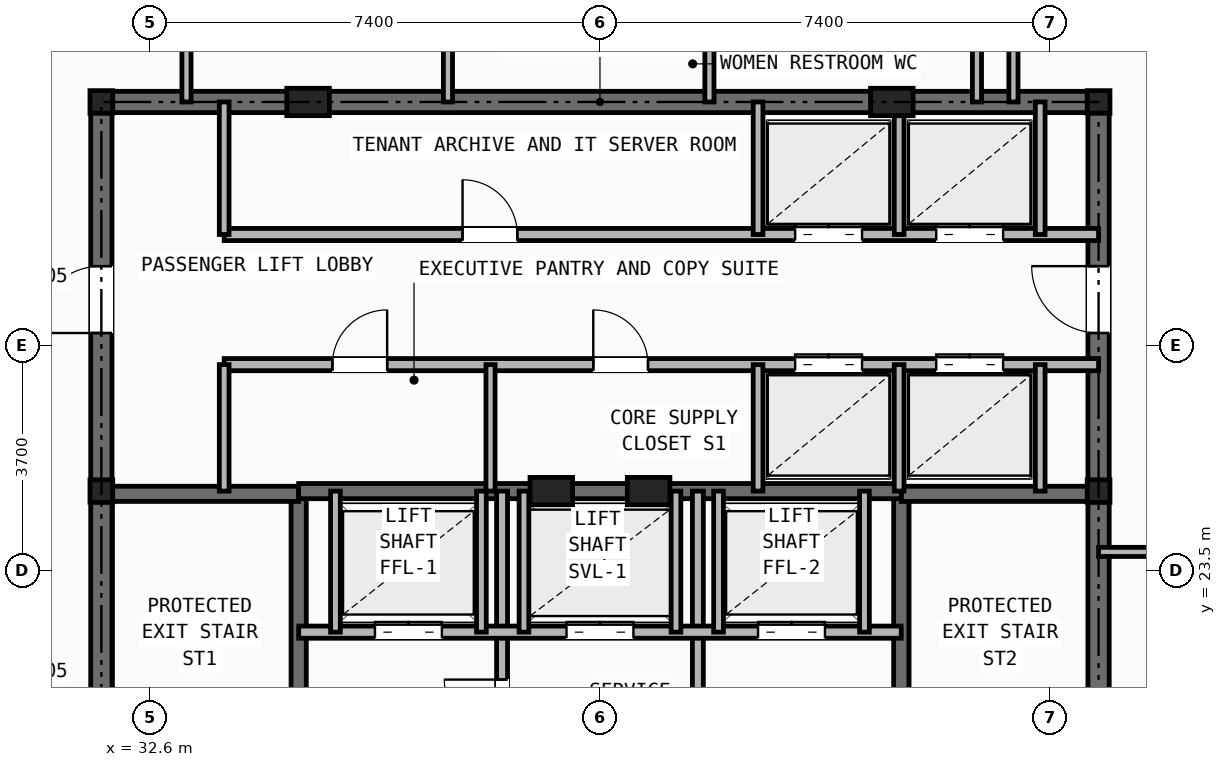
"""IFC4 building model, lengths in metres.
Left out: names, types, materials, properties, quantities, classifications, styles, units other than length and angle.
Written with IfcOpenShell. Run it as: python <this file> out.ifc"""

import sys

from ifc_helpers import new_model, si_unit, direction, frame, frame_2d, origin, origin_2d, place, context, subcontext, project, spatial, rectangle, i_section, extrude, element, fill, save


model = new_model("IFC4")
c1 = context("Model", 3, precision=1e-05, world=origin(), true_north=direction((0.0, 1.0)))
c2 = subcontext(c1, "Body", "Model", "MODEL_VIEW")
j1 = project(units=[si_unit("LENGTHUNIT", "METRE"), si_unit("PLANEANGLEUNIT", "RADIAN")], contexts=[c1])
p1 = place(None, origin())
s1 = spatial("IfcSite", under=j1, at=p1, CompositionType="ELEMENT")
p2 = place(p1, origin())
s2 = spatial("IfcBuilding", under=s1, at=p2, CompositionType="ELEMENT")
p3 = place(p2, frame((0.0, 0.0, 232.9)))
s3 = spatial("IfcBuildingStorey", under=s2, at=p3, CompositionType="ELEMENT", Elevation=232.9)
for number, where, z_axis, x_axis in (
    (1, (31.8, 24.8, 0.0), (0.0, 0.0, 1.0), (1.0, 0.0, 0.0)),
    (2, (48.2, 24.8, 0.0), (0.0, 0.0, 1.0), (1.0, 0.0, 0.0)),
    (3, (31.8, 31.2, 0.0), (0.0, 0.0, 1.0), (1.0, 0.0, 0.0)),
    (4, (48.2, 31.2, 0.0), (0.0, 0.0, 1.0), (1.0, 0.0, 0.0)),
):
    element("IfcColumn", number, at=place(p3, frame(where, z_axis=z_axis, x_axis=x_axis)), inside=s3, PredefinedType="COLUMN", context=c2, shape_type="SweptSolid", body=[
        extrude(i_section(OverallWidth=0.374, OverallDepth=0.372, WebThickness=0.016, FlangeThickness=0.026, at=origin_2d()), origin(), (0.0, 0.0, 1.0), 3.5),
    ])
for number, where, z_axis, x_axis in (
    (5, (35.2, 31.2, 0.0), (0.0, 0.0, 1.0), (1.0, 0.0, 0.0)),
    (6, (44.8, 31.2, 0.0), (0.0, 0.0, 1.0), (1.0, 0.0, 0.0)),
    (7, (39.2, 24.8, 0.0), (0.0, 0.0, 1.0), (1.0, 0.0, 0.0)),
    (8, (40.8, 24.8, 0.0), (0.0, 0.0, 1.0), (1.0, 0.0, 0.0)),
):
    element("IfcColumn", number, at=place(p3, frame(where, z_axis=z_axis, x_axis=x_axis)), inside=s3, PredefinedType="PILASTER", context=c2, shape_type="SweptSolid", body=[
        extrude(rectangle(XDim=0.7, YDim=0.45, at=origin_2d()), origin(), (0.0, 0.0, 1.0), 3.5),
    ])
p4 = place(p3, frame((31.8, 31.2, 0.0), z_axis=(0.0, 0.0, 1.0), x_axis=(1.0, 0.0, 0.0)))
e9 = element("IfcWall", 9, at=p4, inside=s3, PredefinedType="SHEAR", context=c2, shape_type="SweptSolid", body=[
    extrude(rectangle(XDim=16.4, YDim=0.35, at=frame_2d((8.2, 0.0))), origin(), (0.0, 0.0, 1.0), 3.25),
])
p5 = place(p3, frame((31.8, 16.4, 0.0), z_axis=(0.0, 0.0, 1.0), x_axis=(0.0, 1.0, 0.0)))
e10 = element("IfcWall", 10, at=p5, inside=s3, PredefinedType="SHEAR", context=c2, shape_type="SweptSolid", body=[
    extrude(rectangle(XDim=14.8, YDim=0.35, at=frame_2d((7.4, 0.0))), origin(), (0.0, 0.0, 1.0), 3.25),
])
p6 = place(p5, frame((11.0, 0.0, 0.0)))
e11 = element("IfcOpeningElement", 11, at=p6, cuts=e10, PredefinedType="OPENING", context=c2, shape_type="SweptSolid", body=[
    extrude(rectangle(XDim=1.1, YDim=2.15, at=frame_2d((0.55, 1.075))), frame((0.0, 0.185, 0.0), z_axis=(0.0, -1.0, 0.0), x_axis=(1.0, 0.0, 0.0)), (0.0, 0.0, 1.0), 0.37),
])
p7 = place(p3, frame((48.2, 16.4, 0.0), z_axis=(0.0, 0.0, 1.0), x_axis=(0.0, 1.0, 0.0)))
e12 = element("IfcWall", 12, at=p7, inside=s3, PredefinedType="SHEAR", context=c2, shape_type="SweptSolid", body=[
    extrude(rectangle(XDim=14.8, YDim=0.35, at=frame_2d((7.4, 0.0))), origin(), (0.0, 0.0, 1.0), 3.25),
])
p8 = place(p7, frame((11.0, 0.0, 0.0)))
e13 = element("IfcOpeningElement", 13, at=p8, cuts=e12, PredefinedType="OPENING", context=c2, shape_type="SweptSolid", body=[
    extrude(rectangle(XDim=1.1, YDim=2.15, at=frame_2d((0.55, 1.075))), frame((0.0, 0.185, 0.0), z_axis=(0.0, -1.0, 0.0), x_axis=(1.0, 0.0, 0.0)), (0.0, 0.0, 1.0), 0.37),
])
p9 = place(p3, frame((35.045, 16.4, 0.0), z_axis=(0.0, 0.0, 1.0), x_axis=(0.0, 1.0, 0.0)))
e14 = element("IfcWall", 14, at=p9, inside=s3, PredefinedType="SHEAR", context=c2, shape_type="SweptSolid", body=[
    extrude(rectangle(XDim=8.4, YDim=0.25, at=frame_2d((4.2, 0.0))), origin(), (0.0, 0.0, 1.0), 3.25),
])
p10 = place(p9, frame((0.45, 0.0, 0.0)))
e15 = element("IfcOpeningElement", 15, at=p10, cuts=e14, PredefinedType="OPENING", context=c2, shape_type="SweptSolid", body=[
    extrude(rectangle(XDim=0.95, YDim=2.1, at=frame_2d((0.475, 1.05))), frame((0.0, 0.135, 0.0), z_axis=(0.0, -1.0, 0.0), x_axis=(1.0, 0.0, 0.0)), (0.0, 0.0, 1.0), 0.27),
])
p11 = place(p3, frame((31.8, 24.755, 0.0), z_axis=(0.0, 0.0, 1.0), x_axis=(1.0, 0.0, 0.0)))
e16 = element("IfcWall", 16, at=p11, inside=s3, PredefinedType="SHEAR", context=c2, shape_type="SweptSolid", body=[
    extrude(rectangle(XDim=3.245, YDim=0.25, at=frame_2d((1.623, 0.0))), origin(), (0.0, 0.0, 1.0), 3.25),
])
p12 = place(p3, frame((44.955, 16.4, 0.0), z_axis=(0.0, 0.0, 1.0), x_axis=(0.0, 1.0, 0.0)))
e17 = element("IfcWall", 17, at=p12, inside=s3, PredefinedType="SHEAR", context=c2, shape_type="SweptSolid", body=[
    extrude(rectangle(XDim=8.4, YDim=0.25, at=frame_2d((4.2, 0.0))), origin(), (0.0, 0.0, 1.0), 3.25),
])
p13 = place(p12, frame((0.45, 0.0, 0.0)))
e18 = element("IfcOpeningElement", 18, at=p13, cuts=e17, PredefinedType="OPENING", context=c2, shape_type="SweptSolid", body=[
    extrude(rectangle(XDim=0.95, YDim=2.1, at=frame_2d((0.475, 1.05))), frame((0.0, 0.135, 0.0), z_axis=(0.0, -1.0, 0.0), x_axis=(1.0, 0.0, 0.0)), (0.0, 0.0, 1.0), 0.27),
])
p14 = place(p3, frame((44.955, 24.755, 0.0), z_axis=(0.0, 0.0, 1.0), x_axis=(1.0, 0.0, 0.0)))
e19 = element("IfcWall", 19, at=p14, inside=s3, PredefinedType="SHEAR", context=c2, shape_type="SweptSolid", body=[
    extrude(rectangle(XDim=3.245, YDim=0.25, at=frame_2d((1.623, 0.0))), origin(), (0.0, 0.0, 1.0), 3.25),
])
p15 = place(p3, frame((35.045, 24.8, 0.0), z_axis=(0.0, 0.0, 1.0), x_axis=(1.0, 0.0, 0.0)))
e20 = element("IfcWall", 20, at=p15, inside=s3, PredefinedType="SHEAR", context=c2, shape_type="SweptSolid", body=[
    extrude(rectangle(XDim=9.91, YDim=0.25, at=frame_2d((4.955, 0.0))), origin(), (0.0, 0.0, 1.0), 3.25),
])
p16 = place(p3, frame((38.39, 16.4, 0.0), z_axis=(0.0, 0.0, 1.0), x_axis=(0.0, 1.0, 0.0)))
e21 = element("IfcWall", 21, at=p16, inside=s3, PredefinedType="PARTITIONING", context=c2, shape_type="SweptSolid", body=[
    extrude(rectangle(XDim=8.4, YDim=0.18, at=frame_2d((4.2, 0.0))), origin(), (0.0, 0.0, 1.0), 2.705),
])
p17 = place(p16, frame((1.8, 0.0, 0.0)))
e22 = element("IfcOpeningElement", 22, at=p17, cuts=e21, PredefinedType="OPENING", context=c2, shape_type="SweptSolid", body=[
    extrude(rectangle(XDim=0.85, YDim=2.05, at=frame_2d((0.425, 1.025))), frame((0.0, 0.1, 0.0), z_axis=(0.0, -1.0, 0.0), x_axis=(1.0, 0.0, 0.0)), (0.0, 0.0, 1.0), 0.2),
])
p18 = place(p16, frame((4.35, 0.0, 0.0)))
e23 = element("IfcOpeningElement", 23, at=p18, cuts=e21, PredefinedType="OPENING", context=c2, shape_type="SweptSolid", body=[
    extrude(rectangle(XDim=0.95, YDim=2.1, at=frame_2d((0.475, 1.05))), frame((0.0, 0.1, 0.0), z_axis=(0.0, -1.0, 0.0), x_axis=(1.0, 0.0, 0.0)), (0.0, 0.0, 1.0), 0.2),
])
p19 = place(p3, frame((41.61, 16.4, 0.0), z_axis=(0.0, 0.0, 1.0), x_axis=(0.0, 1.0, 0.0)))
e24 = element("IfcWall", 24, at=p19, inside=s3, PredefinedType="PARTITIONING", context=c2, shape_type="SweptSolid", body=[
    extrude(rectangle(XDim=8.4, YDim=0.18, at=frame_2d((4.2, 0.0))), origin(), (0.0, 0.0, 1.0), 2.705),
])
p20 = place(p19, frame((1.8, 0.0, 0.0)))
e25 = element("IfcOpeningElement", 25, at=p20, cuts=e24, PredefinedType="OPENING", context=c2, shape_type="SweptSolid", body=[
    extrude(rectangle(XDim=0.85, YDim=2.05, at=frame_2d((0.425, 1.025))), frame((0.0, 0.1, 0.0), z_axis=(0.0, -1.0, 0.0), x_axis=(1.0, 0.0, 0.0)), (0.0, 0.0, 1.0), 0.2),
])
p21 = place(p3, frame((35.045, 22.48, 0.0), z_axis=(0.0, 0.0, 1.0), x_axis=(1.0, 0.0, 0.0)))
e26 = element("IfcWall", 26, at=p21, inside=s3, PredefinedType="SOLIDWALL", context=c2, shape_type="SweptSolid", body=[
    extrude(rectangle(XDim=9.91, YDim=0.2, at=frame_2d((4.955, 0.0))), origin(), (0.0, 0.0, 1.0), 3.25),
])
p22 = place(p21, frame((1.255, 0.0, 0.0)))
e27 = element("IfcOpeningElement", 27, at=p22, cuts=e26, PredefinedType="OPENING", context=c2, shape_type="SweptSolid", body=[
    extrude(rectangle(XDim=1.1, YDim=2.15, at=frame_2d((0.55, 1.075))), frame((0.0, 0.11, 0.0), z_axis=(0.0, -1.0, 0.0), x_axis=(1.0, 0.0, 0.0)), (0.0, 0.0, 1.0), 0.22),
])
p23 = place(p21, frame((7.555, 0.0, 0.0)))
e28 = element("IfcOpeningElement", 28, at=p23, cuts=e26, PredefinedType="OPENING", context=c2, shape_type="SweptSolid", body=[
    extrude(rectangle(XDim=1.1, YDim=2.15, at=frame_2d((0.55, 1.075))), frame((0.0, 0.11, 0.0), z_axis=(0.0, -1.0, 0.0), x_axis=(1.0, 0.0, 0.0)), (0.0, 0.0, 1.0), 0.22),
])
p24 = place(p21, frame((4.405, 0.0, 0.0)))
e29 = element("IfcOpeningElement", 29, at=p24, cuts=e26, PredefinedType="OPENING", context=c2, shape_type="SweptSolid", body=[
    extrude(rectangle(XDim=1.1, YDim=2.15, at=frame_2d((0.55, 1.075))), frame((0.0, 0.11, 0.0), z_axis=(0.0, -1.0, 0.0), x_axis=(1.0, 0.0, 0.0)), (0.0, 0.0, 1.0), 0.22),
])
for number, where, z_axis, x_axis in (
    (30, (35.65, 22.48, 0.0), (0.0, 0.0, 1.0), (0.0, 1.0, 0.0)),
    (31, (38.05, 22.48, 0.0), (0.0, 0.0, 1.0), (0.0, 1.0, 0.0)),
    (32, (41.95, 22.48, 0.0), (0.0, 0.0, 1.0), (0.0, 1.0, 0.0)),
    (33, (44.35, 22.48, 0.0), (0.0, 0.0, 1.0), (0.0, 1.0, 0.0)),
    (34, (38.75, 22.48, 0.0), (0.0, 0.0, 1.0), (0.0, 1.0, 0.0)),
    (35, (41.25, 22.48, 0.0), (0.0, 0.0, 1.0), (0.0, 1.0, 0.0)),
):
    element("IfcWall", number, at=place(p3, frame(where, z_axis=z_axis, x_axis=x_axis)), inside=s3, PredefinedType="SOLIDWALL", context=c2, shape_type="SweptSolid", body=[
        extrude(rectangle(XDim=2.32, YDim=0.16, at=frame_2d((1.16, 0.0))), origin(), (0.0, 0.0, 1.0), 3.25),
    ])
p25 = place(p3, frame((33.82, 29.02, 0.0), z_axis=(0.0, 0.0, 1.0), x_axis=(1.0, 0.0, 0.0)))
e36 = element("IfcWall", 36, at=p25, inside=s3, PredefinedType="SOLIDWALL", context=c2, shape_type="SweptSolid", body=[
    extrude(rectangle(XDim=14.38, YDim=0.2, at=frame_2d((7.19, 0.0))), origin(), (0.0, 0.0, 1.0), 2.705),
])
p26 = place(p25, frame((3.92, 0.0, 0.0)))
e37 = element("IfcOpeningElement", 37, at=p26, cuts=e36, PredefinedType="OPENING", context=c2, shape_type="SweptSolid", body=[
    extrude(rectangle(XDim=0.9, YDim=2.1, at=frame_2d((0.45, 1.05))), frame((0.0, 0.11, 0.0), z_axis=(0.0, -1.0, 0.0), x_axis=(1.0, 0.0, 0.0)), (0.0, 0.0, 1.0), 0.22),
])
p27 = place(p25, frame((9.39, 0.0, 0.0)))
e38 = element("IfcOpeningElement", 38, at=p27, cuts=e36, PredefinedType="OPENING", context=c2, shape_type="SweptSolid", body=[
    extrude(rectangle(XDim=1.1, YDim=2.15, at=frame_2d((0.55, 1.075))), frame((0.0, 0.11, 0.0), z_axis=(0.0, -1.0, 0.0), x_axis=(1.0, 0.0, 0.0)), (0.0, 0.0, 1.0), 0.22),
])
p28 = place(p25, frame((11.71, 0.0, 0.0)))
e39 = element("IfcOpeningElement", 39, at=p28, cuts=e36, PredefinedType="OPENING", context=c2, shape_type="SweptSolid", body=[
    extrude(rectangle(XDim=1.1, YDim=2.15, at=frame_2d((0.55, 1.075))), frame((0.0, 0.11, 0.0), z_axis=(0.0, -1.0, 0.0), x_axis=(1.0, 0.0, 0.0)), (0.0, 0.0, 1.0), 0.22),
])
p29 = place(p3, frame((33.82, 26.88, 0.0), z_axis=(0.0, 0.0, 1.0), x_axis=(1.0, 0.0, 0.0)))
e40 = element("IfcWall", 40, at=p29, inside=s3, PredefinedType="SOLIDWALL", context=c2, shape_type="SweptSolid", body=[
    extrude(rectangle(XDim=14.38, YDim=0.2, at=frame_2d((7.19, 0.0))), origin(), (0.0, 0.0, 1.0), 2.705),
])
p30 = place(p29, frame((1.78, 0.0, 0.0)))
e41 = element("IfcOpeningElement", 41, at=p30, cuts=e40, PredefinedType="OPENING", context=c2, shape_type="SweptSolid", body=[
    extrude(rectangle(XDim=0.9, YDim=2.1, at=frame_2d((0.45, 1.05))), frame((0.0, 0.11, 0.0), z_axis=(0.0, -1.0, 0.0), x_axis=(1.0, 0.0, 0.0)), (0.0, 0.0, 1.0), 0.22),
])
p31 = place(p29, frame((6.07, 0.0, 0.0)))
e42 = element("IfcOpeningElement", 42, at=p31, cuts=e40, PredefinedType="OPENING", context=c2, shape_type="SweptSolid", body=[
    extrude(rectangle(XDim=0.9, YDim=2.1, at=frame_2d((0.45, 1.05))), frame((0.0, 0.11, 0.0), z_axis=(0.0, -1.0, 0.0), x_axis=(1.0, 0.0, 0.0)), (0.0, 0.0, 1.0), 0.22),
])
p32 = place(p29, frame((9.39, 0.0, 0.0)))
e43 = element("IfcOpeningElement", 43, at=p32, cuts=e40, PredefinedType="OPENING", context=c2, shape_type="SweptSolid", body=[
    extrude(rectangle(XDim=1.1, YDim=2.15, at=frame_2d((0.55, 1.075))), frame((0.0, 0.11, 0.0), z_axis=(0.0, -1.0, 0.0), x_axis=(1.0, 0.0, 0.0)), (0.0, 0.0, 1.0), 0.22),
])
p33 = place(p29, frame((11.71, 0.0, 0.0)))
e44 = element("IfcOpeningElement", 44, at=p33, cuts=e40, PredefinedType="OPENING", context=c2, shape_type="SweptSolid", body=[
    extrude(rectangle(XDim=1.1, YDim=2.15, at=frame_2d((0.55, 1.075))), frame((0.0, 0.11, 0.0), z_axis=(0.0, -1.0, 0.0), x_axis=(1.0, 0.0, 0.0)), (0.0, 0.0, 1.0), 0.22),
])
p34 = place(p3, frame((33.82, 29.02, 0.0), z_axis=(0.0, 0.0, 1.0), x_axis=(0.0, 1.0, 0.0)))
e45 = element("IfcWall", 45, at=p34, inside=s3, PredefinedType="SOLIDWALL", context=c2, shape_type="SweptSolid", body=[
    extrude(rectangle(XDim=2.18, YDim=0.16, at=frame_2d((1.09, 0.0))), origin(), (0.0, 0.0, 1.0), 2.705),
])
p35 = place(p3, frame((33.82, 24.8, 0.0), z_axis=(0.0, 0.0, 1.0), x_axis=(0.0, 1.0, 0.0)))
e46 = element("IfcWall", 46, at=p35, inside=s3, PredefinedType="SOLIDWALL", context=c2, shape_type="SweptSolid", body=[
    extrude(rectangle(XDim=2.08, YDim=0.16, at=frame_2d((1.04, 0.0))), origin(), (0.0, 0.0, 1.0), 3.25),
])
p36 = place(p3, frame((38.2, 24.8, 0.0), z_axis=(0.0, 0.0, 1.0), x_axis=(0.0, 1.0, 0.0)))
e47 = element("IfcWall", 47, at=p36, inside=s3, PredefinedType="PARTITIONING", context=c2, shape_type="SweptSolid", body=[
    extrude(rectangle(XDim=2.08, YDim=0.15, at=frame_2d((1.04, 0.0))), origin(), (0.0, 0.0, 1.0), 3.25),
])
for number, where, z_axis, x_axis in (
    (48, (42.6, 29.02, 0.0), (0.0, 0.0, 1.0), (0.0, 1.0, 0.0)),
    (49, (44.92, 29.02, 0.0), (0.0, 0.0, 1.0), (0.0, 1.0, 0.0)),
    (50, (47.24, 29.02, 0.0), (0.0, 0.0, 1.0), (0.0, 1.0, 0.0)),
):
    element("IfcWall", number, at=place(p3, frame(where, z_axis=z_axis, x_axis=x_axis)), inside=s3, PredefinedType="SOLIDWALL", context=c2, shape_type="SweptSolid", body=[
        extrude(rectangle(XDim=2.18, YDim=0.16, at=frame_2d((1.09, 0.0))), origin(), (0.0, 0.0, 1.0), 2.705),
    ])
for number, where, z_axis, x_axis in (
    (51, (42.6, 24.8, 0.0), (0.0, 0.0, 1.0), (0.0, 1.0, 0.0)),
    (52, (44.92, 24.8, 0.0), (0.0, 0.0, 1.0), (0.0, 1.0, 0.0)),
    (53, (47.24, 24.8, 0.0), (0.0, 0.0, 1.0), (0.0, 1.0, 0.0)),
):
    element("IfcWall", number, at=place(p3, frame(where, z_axis=z_axis, x_axis=x_axis)), inside=s3, PredefinedType="SOLIDWALL", context=c2, shape_type="SweptSolid", body=[
        extrude(rectangle(XDim=2.08, YDim=0.16, at=frame_2d((1.04, 0.0))), origin(), (0.0, 0.0, 1.0), 3.25),
    ])
for number, where, z_axis, x_axis in (
    (54, (33.2, 31.2, 0.0), (0.0, 0.0, 1.0), (0.0, 1.0, 0.0)),
    (55, (46.2, 31.2, 0.0), (0.0, 0.0, 1.0), (0.0, 1.0, 0.0)),
    (56, (37.5, 31.2, 0.0), (0.0, 0.0, 1.0), (0.0, 1.0, 0.0)),
    (57, (41.8, 31.2, 0.0), (0.0, 0.0, 1.0), (0.0, 1.0, 0.0)),
):
    element("IfcWall", number, at=place(p3, frame(where, z_axis=z_axis, x_axis=x_axis)), inside=s3, PredefinedType="PARTITIONING", context=c2, shape_type="SweptSolid", body=[
        extrude(rectangle(XDim=2.6, YDim=0.15, at=frame_2d((1.3, 0.0))), origin(), (0.0, 0.0, 1.0), 2.705),
    ])
p37 = place(p3, frame((46.8, 31.2, 0.0), z_axis=(0.0, 0.0, 1.0), x_axis=(0.0, 1.0, 0.0)))
e58 = element("IfcWall", 58, at=p37, inside=s3, PredefinedType="PARTITIONING", context=c2, shape_type="SweptSolid", body=[
    extrude(rectangle(XDim=4.5, YDim=0.15, at=frame_2d((2.25, 0.0))), origin(), (0.0, 0.0, 1.0), 2.705),
])
p38 = place(p3, frame((48.2, 23.8, 0.0), z_axis=(0.0, 0.0, 1.0), x_axis=(1.0, 0.0, 0.0)))
e59 = element("IfcWall", 59, at=p38, inside=s3, PredefinedType="PARTITIONING", context=c2, shape_type="SweptSolid", body=[
    extrude(rectangle(XDim=10.602, YDim=0.15, at=frame_2d((5.301, 0.0))), origin(), (0.0, 0.0, 1.0), 2.628),
])
p39 = place(p38, frame((1.4, 0.0, 0.0)))
e60 = element("IfcOpeningElement", 60, at=p39, cuts=e59, PredefinedType="OPENING", context=c2, shape_type="SweptSolid", body=[
    extrude(rectangle(XDim=0.95, YDim=2.1, at=frame_2d((0.475, 1.05))), frame((0.0, 0.085, 0.0), z_axis=(0.0, -1.0, 0.0), x_axis=(1.0, 0.0, 0.0)), (0.0, 0.0, 1.0), 0.17),
])
p40 = place(p18, origin())
e61 = element("IfcDoor", 61, at=p40, inside=s3, OperationType="SINGLE_SWING_RIGHT", PredefinedType="DOOR", context=c2, shape_type="SweptSolid", body=[
    extrude(rectangle(XDim=0.95, YDim=2.1, at=frame_2d((0.475, 1.05))), frame((0.0, 0.025, 0.0), z_axis=(0.0, -1.0, 0.0), x_axis=(1.0, 0.0, 0.0)), (0.0, 0.0, 1.0), 0.05),
])
fill(e23, e61)
p41 = place(p22, origin())
e62 = element("IfcDoor", 62, at=p41, inside=s3, OperationType="DOUBLE_DOOR_SLIDING", PredefinedType="DOOR", context=c2, shape_type="SweptSolid", body=[
    extrude(rectangle(XDim=1.1, YDim=2.15, at=frame_2d((0.55, 1.075))), frame((0.0, 0.025, 0.0), z_axis=(0.0, -1.0, 0.0), x_axis=(1.0, 0.0, 0.0)), (0.0, 0.0, 1.0), 0.05),
])
fill(e27, e62)
p42 = place(p23, origin())
e63 = element("IfcDoor", 63, at=p42, inside=s3, OperationType="DOUBLE_DOOR_SLIDING", PredefinedType="DOOR", context=c2, shape_type="SweptSolid", body=[
    extrude(rectangle(XDim=1.1, YDim=2.15, at=frame_2d((0.55, 1.075))), frame((0.0, 0.025, 0.0), z_axis=(0.0, -1.0, 0.0), x_axis=(1.0, 0.0, 0.0)), (0.0, 0.0, 1.0), 0.05),
])
fill(e28, e63)
p43 = place(p24, origin())
e64 = element("IfcDoor", 64, at=p43, inside=s3, OperationType="DOUBLE_DOOR_SLIDING", PredefinedType="DOOR", context=c2, shape_type="SweptSolid", body=[
    extrude(rectangle(XDim=1.1, YDim=2.15, at=frame_2d((0.55, 1.075))), frame((0.0, 0.025, 0.0), z_axis=(0.0, -1.0, 0.0), x_axis=(1.0, 0.0, 0.0)), (0.0, 0.0, 1.0), 0.05),
])
fill(e29, e64)
p44 = place(p6, origin())
e65 = element("IfcDoor", 65, at=p44, inside=s3, OperationType="SINGLE_SWING_LEFT", PredefinedType="DOOR", context=c2, shape_type="SweptSolid", body=[
    extrude(rectangle(XDim=1.1, YDim=2.15, at=frame_2d((0.55, 1.075))), frame((0.0, 0.025, 0.0), z_axis=(0.0, -1.0, 0.0), x_axis=(1.0, 0.0, 0.0)), (0.0, 0.0, 1.0), 0.05),
])
fill(e11, e65)
p45 = place(p8, origin())
e66 = element("IfcDoor", 66, at=p45, inside=s3, OperationType="SINGLE_SWING_RIGHT", PredefinedType="DOOR", context=c2, shape_type="SweptSolid", body=[
    extrude(rectangle(XDim=1.1, YDim=2.15, at=frame_2d((0.55, 1.075))), frame((0.0, 0.025, 0.0), z_axis=(0.0, -1.0, 0.0), x_axis=(1.0, 0.0, 0.0)), (0.0, 0.0, 1.0), 0.05),
])
fill(e13, e66)
p46 = place(p26, origin())
e67 = element("IfcDoor", 67, at=p46, inside=s3, OperationType="SINGLE_SWING_LEFT", PredefinedType="DOOR", context=c2, shape_type="SweptSolid", body=[
    extrude(rectangle(XDim=0.9, YDim=2.1, at=frame_2d((0.45, 1.05))), frame((0.0, 0.025, 0.0), z_axis=(0.0, -1.0, 0.0), x_axis=(1.0, 0.0, 0.0)), (0.0, 0.0, 1.0), 0.05),
])
fill(e37, e67)
p47 = place(p30, origin())
e68 = element("IfcDoor", 68, at=p47, inside=s3, OperationType="SINGLE_SWING_RIGHT", PredefinedType="DOOR", context=c2, shape_type="SweptSolid", body=[
    extrude(rectangle(XDim=0.9, YDim=2.1, at=frame_2d((0.45, 1.05))), frame((0.0, 0.025, 0.0), z_axis=(0.0, -1.0, 0.0), x_axis=(1.0, 0.0, 0.0)), (0.0, 0.0, 1.0), 0.05),
])
fill(e41, e68)
p48 = place(p31, origin())
e69 = element("IfcDoor", 69, at=p48, inside=s3, OperationType="SINGLE_SWING_LEFT", PredefinedType="DOOR", context=c2, shape_type="SweptSolid", body=[
    extrude(rectangle(XDim=0.9, YDim=2.1, at=frame_2d((0.45, 1.05))), frame((0.0, 0.025, 0.0), z_axis=(0.0, -1.0, 0.0), x_axis=(1.0, 0.0, 0.0)), (0.0, 0.0, 1.0), 0.05),
])
fill(e42, e69)
p49 = place(p27, origin())
e70 = element("IfcDoor", 70, at=p49, inside=s3, OperationType="DOUBLE_DOOR_SLIDING", PredefinedType="DOOR", context=c2, shape_type="SweptSolid", body=[
    extrude(rectangle(XDim=1.1, YDim=2.15, at=frame_2d((0.55, 1.075))), frame((0.0, 0.025, 0.0), z_axis=(0.0, -1.0, 0.0), x_axis=(1.0, 0.0, 0.0)), (0.0, 0.0, 1.0), 0.05),
])
fill(e38, e70)
p50 = place(p28, origin())
e71 = element("IfcDoor", 71, at=p50, inside=s3, OperationType="DOUBLE_DOOR_SLIDING", PredefinedType="DOOR", context=c2, shape_type="SweptSolid", body=[
    extrude(rectangle(XDim=1.1, YDim=2.15, at=frame_2d((0.55, 1.075))), frame((0.0, 0.025, 0.0), z_axis=(0.0, -1.0, 0.0), x_axis=(1.0, 0.0, 0.0)), (0.0, 0.0, 1.0), 0.05),
])
fill(e39, e71)
p51 = place(p32, origin())
e72 = element("IfcDoor", 72, at=p51, inside=s3, OperationType="DOUBLE_DOOR_SLIDING", PredefinedType="DOOR", context=c2, shape_type="SweptSolid", body=[
    extrude(rectangle(XDim=1.1, YDim=2.15, at=frame_2d((0.55, 1.075))), frame((0.0, 0.025, 0.0), z_axis=(0.0, -1.0, 0.0), x_axis=(1.0, 0.0, 0.0)), (0.0, 0.0, 1.0), 0.05),
])
fill(e43, e72)
p52 = place(p33, origin())
e73 = element("IfcDoor", 73, at=p52, inside=s3, OperationType="DOUBLE_DOOR_SLIDING", PredefinedType="DOOR", context=c2, shape_type="SweptSolid", body=[
    extrude(rectangle(XDim=1.1, YDim=2.15, at=frame_2d((0.55, 1.075))), frame((0.0, 0.025, 0.0), z_axis=(0.0, -1.0, 0.0), x_axis=(1.0, 0.0, 0.0)), (0.0, 0.0, 1.0), 0.05),
])
fill(e44, e73)
save(model, sys.argv[1])
